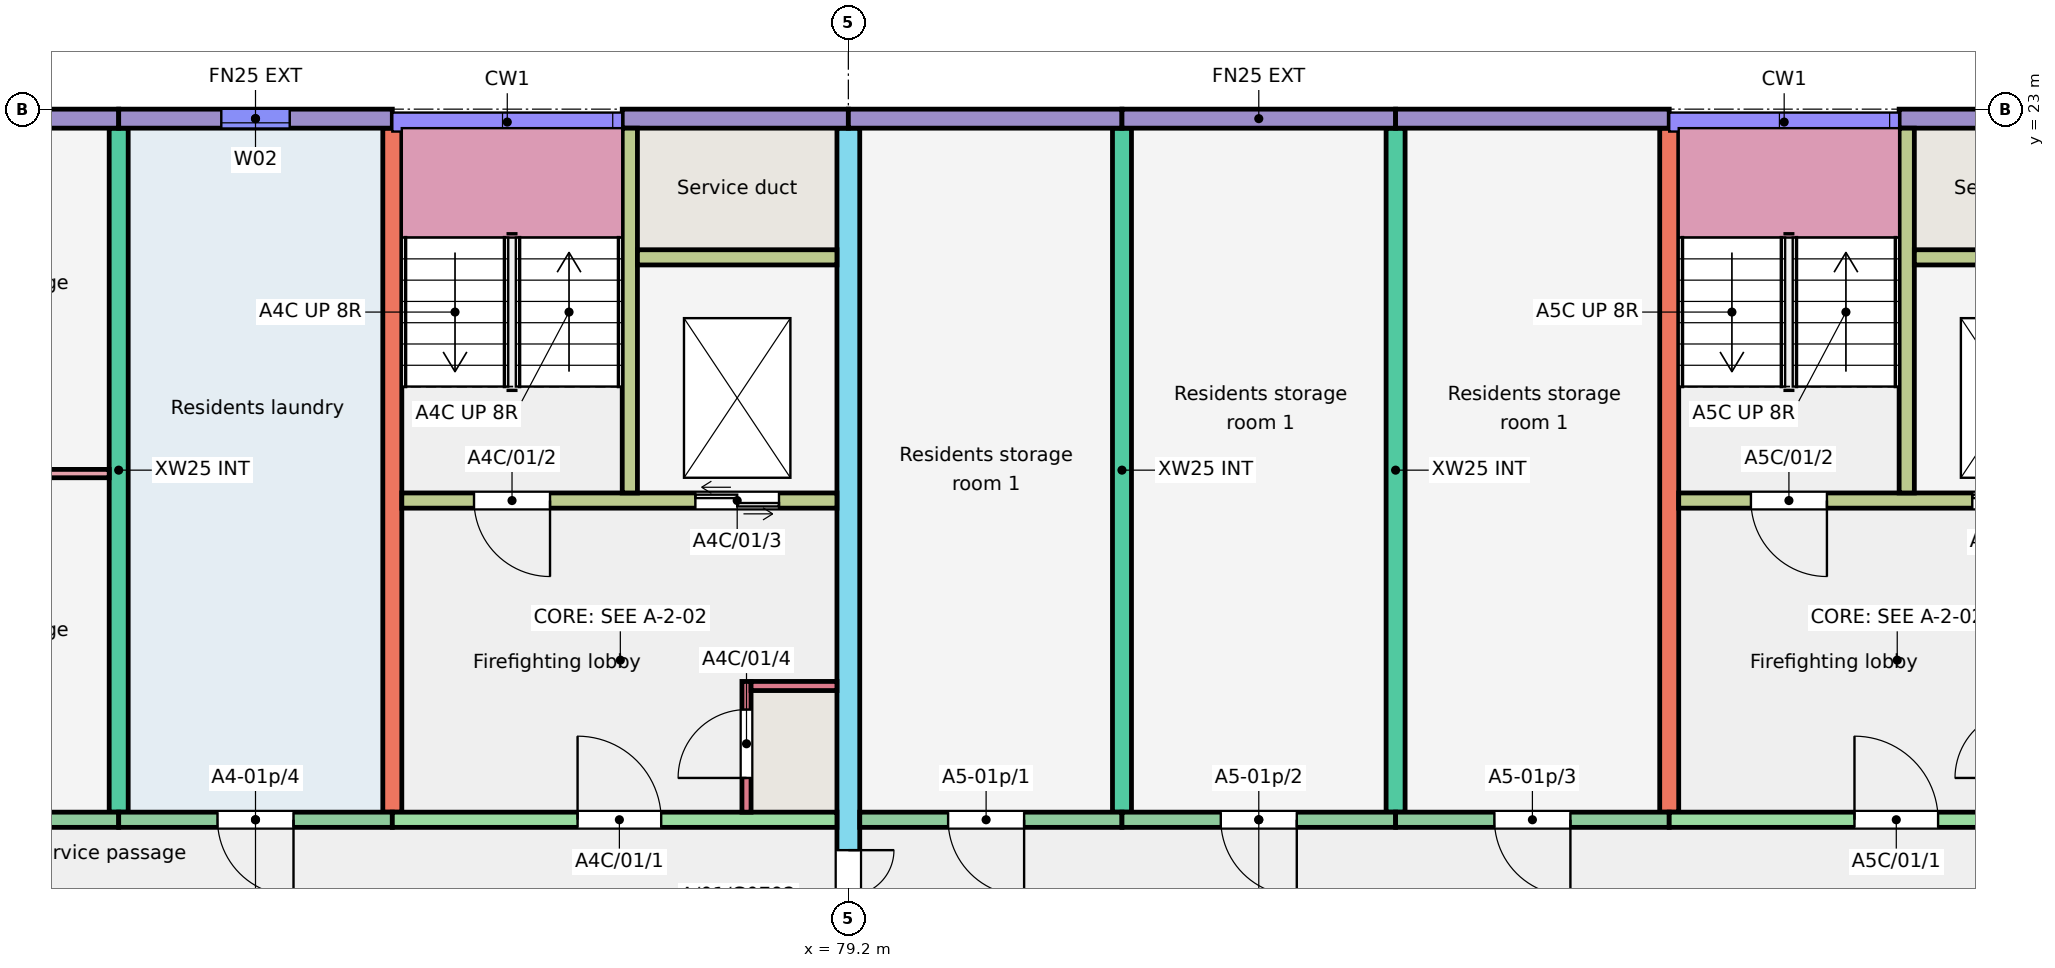
"""IFC4 building model, lengths in metres.
Left out: names, types, materials, properties, quantities, classifications, styles, units other than length and angle.
Written with IfcOpenShell. Run it as: python <this file> out.ifc"""

import sys

from ifc_helpers import new_model, si_unit, direction, frame, frame_2d, origin, place, context, subcontext, project, spatial, rectangle, extrude, element, fill, save


model = new_model("IFC4")
c1 = context("Model", 3, precision=1e-05, world=origin(), true_north=direction((0.0, 1.0)))
c2 = subcontext(c1, "Body", "Model", "MODEL_VIEW")
j1 = project(units=[si_unit("LENGTHUNIT", "METRE"), si_unit("PLANEANGLEUNIT", "RADIAN")], contexts=[c1])
p1 = place(None, origin())
s1 = spatial("IfcSite", under=j1, at=p1, CompositionType="ELEMENT")
p2 = place(p1, origin())
s2 = spatial("IfcBuilding", under=s1, at=p2, CompositionType="ELEMENT")
p3 = place(p2, frame((0.0, 0.0, 3.0)))
s3 = spatial("IfcBuildingStorey", under=s2, at=p3, CompositionType="ELEMENT", Elevation=3.0)
for number, where, z_axis, x_axis in (
    (1, (69.6, 13.75, 0.0), (0.0, 0.0, 1.0), (0.0, 1.0, 0.0)),
    (2, (73.2, 13.75, 0.0), (0.0, 0.0, 1.0), (0.0, 1.0, 0.0)),
):
    element("IfcWall", number, at=place(p3, frame(where, z_axis=z_axis, x_axis=x_axis)), inside=s3, PredefinedType="SHEAR", context=c2, shape_type="SweptSolid", body=[
        extrude(rectangle(XDim=9.0, YDim=0.25, at=frame_2d((4.5, 0.0))), origin(), (0.0, 0.0, 1.0), 3.0),
    ])
p4 = place(p3, frame((79.2, 11.75, 0.0), z_axis=(0.0, 0.0, 1.0), x_axis=(0.0, 1.0, 0.0)))
e3 = element("IfcWall", 3, at=p4, inside=s3, PredefinedType="SHEAR", context=c2, shape_type="SweptSolid", body=[
    extrude(rectangle(XDim=11.0, YDim=0.3, at=frame_2d((5.5, 0.0))), origin(), (0.0, 0.0, 1.0), 3.0),
])
p5 = place(p4, frame((0.3, 0.0, 0.0)))
e4 = element("IfcOpeningElement", 4, at=p5, cuts=e3, PredefinedType="OPENING", context=c2, shape_type="SweptSolid", body=[
    extrude(rectangle(XDim=1.2, YDim=2.1, at=frame_2d((0.6, 1.05))), frame((0.0, 0.16, 0.0), z_axis=(0.0, -1.0, 0.0), x_axis=(1.0, 0.0, 0.0)), (0.0, 0.0, 1.0), 0.32),
])
for number, where, z_axis, x_axis in (
    (5, (82.8, 13.75, 0.0), (0.0, 0.0, 1.0), (0.0, 1.0, 0.0)),
    (6, (86.4, 13.75, 0.0), (0.0, 0.0, 1.0), (0.0, 1.0, 0.0)),
    (7, (90.0, 13.75, 0.0), (0.0, 0.0, 1.0), (0.0, 1.0, 0.0)),
):
    element("IfcWall", number, at=place(p3, frame(where, z_axis=z_axis, x_axis=x_axis)), inside=s3, PredefinedType="SHEAR", context=c2, shape_type="SweptSolid", body=[
        extrude(rectangle(XDim=9.0, YDim=0.25, at=frame_2d((4.5, 0.0))), origin(), (0.0, 0.0, 1.0), 3.0),
    ])
p6 = place(p3, frame((66.0, 22.875, 0.0), z_axis=(0.0, 0.0, 1.0), x_axis=(1.0, 0.0, 0.0)))
e8 = element("IfcWall", 8, at=p6, inside=s3, PredefinedType="SOLIDWALL", context=c2, shape_type="SweptSolid", body=[
    extrude(rectangle(XDim=3.6, YDim=0.25, at=frame_2d((1.8, 0.0))), origin(), (0.0, 0.0, 1.0), 3.0),
])
p7 = place(p3, frame((66.0, 13.65, 0.0), z_axis=(0.0, 0.0, 1.0), x_axis=(1.0, 0.0, 0.0)))
e9 = element("IfcWall", 9, at=p7, inside=s3, PredefinedType="SOLIDWALL", context=c2, shape_type="SweptSolid", body=[
    extrude(rectangle(XDim=3.6, YDim=0.2, at=frame_2d((1.8, 0.0))), origin(), (0.0, 0.0, 1.0), 3.0),
])
p8 = place(p7, frame((1.3, 0.0, 0.0)))
e10 = element("IfcOpeningElement", 10, at=p8, cuts=e9, PredefinedType="OPENING", context=c2, shape_type="SweptSolid", body=[
    extrude(rectangle(XDim=1.0, YDim=2.1, at=frame_2d((0.5, 1.05))), frame((0.0, 0.11, 0.0), z_axis=(0.0, -1.0, 0.0), x_axis=(1.0, 0.0, 0.0)), (0.0, 0.0, 1.0), 0.22),
])
p9 = place(p3, frame((69.6, 22.875, 0.0), z_axis=(0.0, 0.0, 1.0), x_axis=(1.0, 0.0, 0.0)))
e11 = element("IfcWall", 11, at=p9, inside=s3, PredefinedType="SOLIDWALL", context=c2, shape_type="SweptSolid", body=[
    extrude(rectangle(XDim=3.6, YDim=0.25, at=frame_2d((1.8, 0.0))), origin(), (0.0, 0.0, 1.0), 3.0),
])
p10 = place(p9, frame((1.35, 0.0, 1.8)))
e12 = element("IfcOpeningElement", 12, at=p10, cuts=e11, PredefinedType="OPENING", context=c2, shape_type="SweptSolid", body=[
    extrude(rectangle(XDim=0.9, YDim=0.6, at=frame_2d((0.45, 0.3))), frame((0.0, 0.135, 0.0), z_axis=(0.0, -1.0, 0.0), x_axis=(1.0, 0.0, 0.0)), (0.0, 0.0, 1.0), 0.27),
])
p11 = place(p3, frame((69.6, 13.65, 0.0), z_axis=(0.0, 0.0, 1.0), x_axis=(1.0, 0.0, 0.0)))
e13 = element("IfcWall", 13, at=p11, inside=s3, PredefinedType="SOLIDWALL", context=c2, shape_type="SweptSolid", body=[
    extrude(rectangle(XDim=3.6, YDim=0.2, at=frame_2d((1.8, 0.0))), origin(), (0.0, 0.0, 1.0), 3.0),
])
p12 = place(p11, frame((1.3, 0.0, 0.0)))
e14 = element("IfcOpeningElement", 14, at=p12, cuts=e13, PredefinedType="OPENING", context=c2, shape_type="SweptSolid", body=[
    extrude(rectangle(XDim=1.0, YDim=2.1, at=frame_2d((0.5, 1.05))), frame((0.0, 0.11, 0.0), z_axis=(0.0, -1.0, 0.0), x_axis=(1.0, 0.0, 0.0)), (0.0, 0.0, 1.0), 0.22),
])
p13 = place(p3, frame((76.225, 22.875, 0.0), z_axis=(0.0, 0.0, 1.0), x_axis=(1.0, 0.0, 0.0)))
e15 = element("IfcWall", 15, at=p13, inside=s3, PredefinedType="SOLIDWALL", context=c2, shape_type="SweptSolid", body=[
    extrude(rectangle(XDim=2.975, YDim=0.25, at=frame_2d((1.487, 0.0))), origin(), (0.0, 0.0, 1.0), 3.0),
])
p14 = place(p3, frame((73.2, 13.65, 0.0), z_axis=(0.0, 0.0, 1.0), x_axis=(1.0, 0.0, 0.0)))
e16 = element("IfcWall", 16, at=p14, inside=s3, PredefinedType="SHEAR", context=c2, shape_type="SweptSolid", body=[
    extrude(rectangle(XDim=5.85, YDim=0.2, at=frame_2d((2.925, 0.0))), origin(), (0.0, 0.0, 1.0), 3.0),
])
p15 = place(p14, frame((2.438, 0.0, 0.0)))
e17 = element("IfcOpeningElement", 17, at=p15, cuts=e16, PredefinedType="OPENING", context=c2, shape_type="SweptSolid", body=[
    extrude(rectangle(XDim=1.1, YDim=2.1, at=frame_2d((0.55, 1.05))), frame((0.0, 0.11, 0.0), z_axis=(0.0, -1.0, 0.0), x_axis=(1.0, 0.0, 0.0)), (0.0, 0.0, 1.0), 0.22),
])
p16 = place(p3, frame((73.325, 17.85, 0.0), z_axis=(0.0, 0.0, 1.0), x_axis=(1.0, 0.0, 0.0)))
e18 = element("IfcWall", 18, at=p16, inside=s3, PredefinedType="SHEAR", context=c2, shape_type="SweptSolid", body=[
    extrude(rectangle(XDim=5.725, YDim=0.2, at=frame_2d((2.863, 0.0))), origin(), (0.0, 0.0, 1.0), 3.0),
])
p17 = place(p16, frame((0.95, 0.0, 0.0)))
e19 = element("IfcOpeningElement", 19, at=p17, cuts=e18, PredefinedType="OPENING", context=c2, shape_type="SweptSolid", body=[
    extrude(rectangle(XDim=1.0, YDim=2.1, at=frame_2d((0.5, 1.05))), frame((0.0, 0.11, 0.0), z_axis=(0.0, -1.0, 0.0), x_axis=(1.0, 0.0, 0.0)), (0.0, 0.0, 1.0), 0.22),
])
p18 = place(p16, frame((3.863, 0.0, 0.0)))
e20 = element("IfcOpeningElement", 20, at=p18, cuts=e18, PredefinedType="OPENING", context=c2, shape_type="SweptSolid", body=[
    extrude(rectangle(XDim=1.1, YDim=2.1, at=frame_2d((0.55, 1.05))), frame((0.0, 0.11, 0.0), z_axis=(0.0, -1.0, 0.0), x_axis=(1.0, 0.0, 0.0)), (0.0, 0.0, 1.0), 0.22),
])
p19 = place(p3, frame((76.325, 17.95, 0.0), z_axis=(0.0, 0.0, 1.0), x_axis=(0.0, 1.0, 0.0)))
e21 = element("IfcWall", 21, at=p19, inside=s3, PredefinedType="SHEAR", context=c2, shape_type="SweptSolid", body=[
    extrude(rectangle(XDim=4.8, YDim=0.2, at=frame_2d((2.4, 0.0))), origin(), (0.0, 0.0, 1.0), 3.0),
])
p20 = place(p3, frame((76.425, 21.05, 0.0), z_axis=(0.0, 0.0, 1.0), x_axis=(1.0, 0.0, 0.0)))
e22 = element("IfcWall", 22, at=p20, inside=s3, PredefinedType="SHEAR", context=c2, shape_type="SweptSolid", body=[
    extrude(rectangle(XDim=2.625, YDim=0.2, at=frame_2d((1.312, 0.0))), origin(), (0.0, 0.0, 1.0), 3.0),
])
p21 = place(p3, frame((77.86, 13.75, 0.0), z_axis=(0.0, 0.0, 1.0), x_axis=(0.0, 1.0, 0.0)))
e23 = element("IfcWall", 23, at=p21, inside=s3, PredefinedType="SHEAR", context=c2, shape_type="SweptSolid", body=[
    extrude(rectangle(XDim=1.72, YDim=0.12, at=frame_2d((0.86, 0.0))), origin(), (0.0, 0.0, 1.0), 3.0),
])
p22 = place(p21, frame((0.45, 0.0, 0.0)))
e24 = element("IfcOpeningElement", 24, at=p22, cuts=e23, PredefinedType="OPENING", context=c2, shape_type="SweptSolid", body=[
    extrude(rectangle(XDim=0.9, YDim=2.1, at=frame_2d((0.45, 1.05))), frame((0.0, 0.07, 0.0), z_axis=(0.0, -1.0, 0.0), x_axis=(1.0, 0.0, 0.0)), (0.0, 0.0, 1.0), 0.14),
])
p23 = place(p3, frame((77.92, 15.41, 0.0), z_axis=(0.0, 0.0, 1.0), x_axis=(1.0, 0.0, 0.0)))
e25 = element("IfcWall", 25, at=p23, inside=s3, PredefinedType="SHEAR", context=c2, shape_type="SweptSolid", body=[
    extrude(rectangle(XDim=1.13, YDim=0.12, at=frame_2d((0.565, 0.0))), origin(), (0.0, 0.0, 1.0), 3.0),
])
p24 = place(p3, frame((79.2, 22.875, 0.0), z_axis=(0.0, 0.0, 1.0), x_axis=(1.0, 0.0, 0.0)))
e26 = element("IfcWall", 26, at=p24, inside=s3, PredefinedType="SOLIDWALL", context=c2, shape_type="SweptSolid", body=[
    extrude(rectangle(XDim=3.6, YDim=0.25, at=frame_2d((1.8, 0.0))), origin(), (0.0, 0.0, 1.0), 3.0),
])
p25 = place(p3, frame((79.35, 13.65, 0.0), z_axis=(0.0, 0.0, 1.0), x_axis=(1.0, 0.0, 0.0)))
e27 = element("IfcWall", 27, at=p25, inside=s3, PredefinedType="SOLIDWALL", context=c2, shape_type="SweptSolid", body=[
    extrude(rectangle(XDim=3.45, YDim=0.2, at=frame_2d((1.725, 0.0))), origin(), (0.0, 0.0, 1.0), 3.0),
])
p26 = place(p25, frame((1.163, 0.0, 0.0)))
e28 = element("IfcOpeningElement", 28, at=p26, cuts=e27, PredefinedType="OPENING", context=c2, shape_type="SweptSolid", body=[
    extrude(rectangle(XDim=1.0, YDim=2.1, at=frame_2d((0.5, 1.05))), frame((0.0, 0.11, 0.0), z_axis=(0.0, -1.0, 0.0), x_axis=(1.0, 0.0, 0.0)), (0.0, 0.0, 1.0), 0.22),
])
p27 = place(p3, frame((82.8, 22.875, 0.0), z_axis=(0.0, 0.0, 1.0), x_axis=(1.0, 0.0, 0.0)))
e29 = element("IfcWall", 29, at=p27, inside=s3, PredefinedType="SOLIDWALL", context=c2, shape_type="SweptSolid", body=[
    extrude(rectangle(XDim=3.6, YDim=0.25, at=frame_2d((1.8, 0.0))), origin(), (0.0, 0.0, 1.0), 3.0),
])
p28 = place(p3, frame((82.8, 13.65, 0.0), z_axis=(0.0, 0.0, 1.0), x_axis=(1.0, 0.0, 0.0)))
e30 = element("IfcWall", 30, at=p28, inside=s3, PredefinedType="SOLIDWALL", context=c2, shape_type="SweptSolid", body=[
    extrude(rectangle(XDim=3.6, YDim=0.2, at=frame_2d((1.8, 0.0))), origin(), (0.0, 0.0, 1.0), 3.0),
])
p29 = place(p28, frame((1.3, 0.0, 0.0)))
e31 = element("IfcOpeningElement", 31, at=p29, cuts=e30, PredefinedType="OPENING", context=c2, shape_type="SweptSolid", body=[
    extrude(rectangle(XDim=1.0, YDim=2.1, at=frame_2d((0.5, 1.05))), frame((0.0, 0.11, 0.0), z_axis=(0.0, -1.0, 0.0), x_axis=(1.0, 0.0, 0.0)), (0.0, 0.0, 1.0), 0.22),
])
p30 = place(p3, frame((86.4, 22.875, 0.0), z_axis=(0.0, 0.0, 1.0), x_axis=(1.0, 0.0, 0.0)))
e32 = element("IfcWall", 32, at=p30, inside=s3, PredefinedType="SOLIDWALL", context=c2, shape_type="SweptSolid", body=[
    extrude(rectangle(XDim=3.6, YDim=0.25, at=frame_2d((1.8, 0.0))), origin(), (0.0, 0.0, 1.0), 3.0),
])
p31 = place(p3, frame((86.4, 13.65, 0.0), z_axis=(0.0, 0.0, 1.0), x_axis=(1.0, 0.0, 0.0)))
e33 = element("IfcWall", 33, at=p31, inside=s3, PredefinedType="SOLIDWALL", context=c2, shape_type="SweptSolid", body=[
    extrude(rectangle(XDim=3.6, YDim=0.2, at=frame_2d((1.8, 0.0))), origin(), (0.0, 0.0, 1.0), 3.0),
])
p32 = place(p31, frame((1.3, 0.0, 0.0)))
e34 = element("IfcOpeningElement", 34, at=p32, cuts=e33, PredefinedType="OPENING", context=c2, shape_type="SweptSolid", body=[
    extrude(rectangle(XDim=1.0, YDim=2.1, at=frame_2d((0.5, 1.05))), frame((0.0, 0.11, 0.0), z_axis=(0.0, -1.0, 0.0), x_axis=(1.0, 0.0, 0.0)), (0.0, 0.0, 1.0), 0.22),
])
p33 = place(p3, frame((93.025, 22.875, 0.0), z_axis=(0.0, 0.0, 1.0), x_axis=(1.0, 0.0, 0.0)))
e35 = element("IfcWall", 35, at=p33, inside=s3, PredefinedType="SOLIDWALL", context=c2, shape_type="SweptSolid", body=[
    extrude(rectangle(XDim=2.975, YDim=0.25, at=frame_2d((1.488, 0.0))), origin(), (0.0, 0.0, 1.0), 3.0),
])
p34 = place(p3, frame((90.0, 13.65, 0.0), z_axis=(0.0, 0.0, 1.0), x_axis=(1.0, 0.0, 0.0)))
e36 = element("IfcWall", 36, at=p34, inside=s3, PredefinedType="SHEAR", context=c2, shape_type="SweptSolid", body=[
    extrude(rectangle(XDim=5.85, YDim=0.2, at=frame_2d((2.925, 0.0))), origin(), (0.0, 0.0, 1.0), 3.0),
])
p35 = place(p34, frame((2.438, 0.0, 0.0)))
e37 = element("IfcOpeningElement", 37, at=p35, cuts=e36, PredefinedType="OPENING", context=c2, shape_type="SweptSolid", body=[
    extrude(rectangle(XDim=1.1, YDim=2.1, at=frame_2d((0.55, 1.05))), frame((0.0, 0.11, 0.0), z_axis=(0.0, -1.0, 0.0), x_axis=(1.0, 0.0, 0.0)), (0.0, 0.0, 1.0), 0.22),
])
p36 = place(p3, frame((90.125, 17.85, 0.0), z_axis=(0.0, 0.0, 1.0), x_axis=(1.0, 0.0, 0.0)))
e38 = element("IfcWall", 38, at=p36, inside=s3, PredefinedType="SHEAR", context=c2, shape_type="SweptSolid", body=[
    extrude(rectangle(XDim=5.725, YDim=0.2, at=frame_2d((2.863, 0.0))), origin(), (0.0, 0.0, 1.0), 3.0),
])
p37 = place(p36, frame((0.95, 0.0, 0.0)))
e39 = element("IfcOpeningElement", 39, at=p37, cuts=e38, PredefinedType="OPENING", context=c2, shape_type="SweptSolid", body=[
    extrude(rectangle(XDim=1.0, YDim=2.1, at=frame_2d((0.5, 1.05))), frame((0.0, 0.11, 0.0), z_axis=(0.0, -1.0, 0.0), x_axis=(1.0, 0.0, 0.0)), (0.0, 0.0, 1.0), 0.22),
])
p38 = place(p36, frame((3.863, 0.0, 0.0)))
e40 = element("IfcOpeningElement", 40, at=p38, cuts=e38, PredefinedType="OPENING", context=c2, shape_type="SweptSolid", body=[
    extrude(rectangle(XDim=1.1, YDim=2.1, at=frame_2d((0.55, 1.05))), frame((0.0, 0.11, 0.0), z_axis=(0.0, -1.0, 0.0), x_axis=(1.0, 0.0, 0.0)), (0.0, 0.0, 1.0), 0.22),
])
p39 = place(p3, frame((93.125, 17.95, 0.0), z_axis=(0.0, 0.0, 1.0), x_axis=(0.0, 1.0, 0.0)))
e41 = element("IfcWall", 41, at=p39, inside=s3, PredefinedType="SHEAR", context=c2, shape_type="SweptSolid", body=[
    extrude(rectangle(XDim=4.8, YDim=0.2, at=frame_2d((2.4, 0.0))), origin(), (0.0, 0.0, 1.0), 3.0),
])
p40 = place(p3, frame((93.225, 21.05, 0.0), z_axis=(0.0, 0.0, 1.0), x_axis=(1.0, 0.0, 0.0)))
e42 = element("IfcWall", 42, at=p40, inside=s3, PredefinedType="SHEAR", context=c2, shape_type="SweptSolid", body=[
    extrude(rectangle(XDim=2.625, YDim=0.2, at=frame_2d((1.312, 0.0))), origin(), (0.0, 0.0, 1.0), 3.0),
])
p41 = place(p3, frame((66.125, 18.205, 0.0), z_axis=(0.0, 0.0, 1.0), x_axis=(1.0, 0.0, 0.0)))
e43 = element("IfcWall", 43, at=p41, inside=s3, PredefinedType="PARTITIONING", context=c2, shape_type="SweptSolid", body=[
    extrude(rectangle(XDim=3.35, YDim=0.11, at=frame_2d((1.675, 0.0))), origin(), (0.0, 0.0, 1.0), 2.8),
])
p42 = place(p41, frame((1.225, 0.0, 0.0)))
e44 = element("IfcOpeningElement", 44, at=p42, cuts=e43, PredefinedType="OPENING", context=c2, shape_type="SweptSolid", body=[
    extrude(rectangle(XDim=0.9, YDim=2.1, at=frame_2d((0.45, 1.05))), frame((0.0, 0.065, 0.0), z_axis=(0.0, -1.0, 0.0), x_axis=(1.0, 0.0, 0.0)), (0.0, 0.0, 1.0), 0.13),
])
p43 = place(p10, origin())
e45 = element("IfcWindow", 45, at=p43, inside=s3, PartitioningType="SINGLE_PANEL", PredefinedType="WINDOW", context=c2, shape_type="SweptSolid", body=[
    extrude(rectangle(XDim=0.9, YDim=0.6, at=frame_2d((0.45, 0.3))), frame((0.0, -0.025, 0.0), z_axis=(0.0, -1.0, 0.0), x_axis=(1.0, 0.0, 0.0)), (0.0, 0.0, 1.0), 0.06),
])
fill(e12, e45)
p44 = place(p12, origin())
e46 = element("IfcDoor", 46, at=p44, inside=s3, OperationType="SINGLE_SWING_RIGHT", PredefinedType="DOOR", context=c2, shape_type="SweptSolid", body=[
    extrude(rectangle(XDim=1.0, YDim=2.1, at=frame_2d((0.5, 1.05))), frame((0.0, 0.025, 0.0), z_axis=(0.0, -1.0, 0.0), x_axis=(1.0, 0.0, 0.0)), (0.0, 0.0, 1.0), 0.05),
])
fill(e14, e46)
p45 = place(p26, origin())
e47 = element("IfcDoor", 47, at=p45, inside=s3, OperationType="SINGLE_SWING_RIGHT", PredefinedType="DOOR", context=c2, shape_type="SweptSolid", body=[
    extrude(rectangle(XDim=1.0, YDim=2.1, at=frame_2d((0.5, 1.05))), frame((0.0, 0.025, 0.0), z_axis=(0.0, -1.0, 0.0), x_axis=(1.0, 0.0, 0.0)), (0.0, 0.0, 1.0), 0.05),
])
fill(e28, e47)
p46 = place(p29, origin())
e48 = element("IfcDoor", 48, at=p46, inside=s3, OperationType="SINGLE_SWING_RIGHT", PredefinedType="DOOR", context=c2, shape_type="SweptSolid", body=[
    extrude(rectangle(XDim=1.0, YDim=2.1, at=frame_2d((0.5, 1.05))), frame((0.0, 0.025, 0.0), z_axis=(0.0, -1.0, 0.0), x_axis=(1.0, 0.0, 0.0)), (0.0, 0.0, 1.0), 0.05),
])
fill(e31, e48)
p47 = place(p32, origin())
e49 = element("IfcDoor", 49, at=p47, inside=s3, OperationType="SINGLE_SWING_RIGHT", PredefinedType="DOOR", context=c2, shape_type="SweptSolid", body=[
    extrude(rectangle(XDim=1.0, YDim=2.1, at=frame_2d((0.5, 1.05))), frame((0.0, 0.025, 0.0), z_axis=(0.0, -1.0, 0.0), x_axis=(1.0, 0.0, 0.0)), (0.0, 0.0, 1.0), 0.05),
])
fill(e34, e49)
p48 = place(p15, origin())
e50 = element("IfcDoor", 50, at=p48, inside=s3, OperationType="SINGLE_SWING_LEFT", PredefinedType="DOOR", context=c2, shape_type="SweptSolid", body=[
    extrude(rectangle(XDim=1.1, YDim=2.1, at=frame_2d((0.55, 1.05))), frame((0.0, 0.025, 0.0), z_axis=(0.0, -1.0, 0.0), x_axis=(1.0, 0.0, 0.0)), (0.0, 0.0, 1.0), 0.05),
])
fill(e17, e50)
p49 = place(p17, origin())
e51 = element("IfcDoor", 51, at=p49, inside=s3, OperationType="SINGLE_SWING_RIGHT", PredefinedType="DOOR", context=c2, shape_type="SweptSolid", body=[
    extrude(rectangle(XDim=1.0, YDim=2.1, at=frame_2d((0.5, 1.05))), frame((0.0, 0.025, 0.0), z_axis=(0.0, -1.0, 0.0), x_axis=(1.0, 0.0, 0.0)), (0.0, 0.0, 1.0), 0.05),
])
fill(e19, e51)
p50 = place(p18, origin())
e52 = element("IfcDoor", 52, at=p50, inside=s3, OperationType="DOUBLE_DOOR_SLIDING", PredefinedType="DOOR", context=c2, shape_type="SweptSolid", body=[
    extrude(rectangle(XDim=1.1, YDim=2.1, at=frame_2d((0.55, 1.05))), frame((0.0, 0.025, 0.0), z_axis=(0.0, -1.0, 0.0), x_axis=(1.0, 0.0, 0.0)), (0.0, 0.0, 1.0), 0.05),
])
fill(e20, e52)
p51 = place(p22, origin())
e53 = element("IfcDoor", 53, at=p51, inside=s3, OperationType="SINGLE_SWING_LEFT", PredefinedType="DOOR", context=c2, shape_type="SweptSolid", body=[
    extrude(rectangle(XDim=0.9, YDim=2.1, at=frame_2d((0.45, 1.05))), frame((0.0, 0.025, 0.0), z_axis=(0.0, -1.0, 0.0), x_axis=(1.0, 0.0, 0.0)), (0.0, 0.0, 1.0), 0.05),
])
fill(e24, e53)
p52 = place(p35, origin())
e54 = element("IfcDoor", 54, at=p52, inside=s3, OperationType="SINGLE_SWING_LEFT", PredefinedType="DOOR", context=c2, shape_type="SweptSolid", body=[
    extrude(rectangle(XDim=1.1, YDim=2.1, at=frame_2d((0.55, 1.05))), frame((0.0, 0.025, 0.0), z_axis=(0.0, -1.0, 0.0), x_axis=(1.0, 0.0, 0.0)), (0.0, 0.0, 1.0), 0.05),
])
fill(e37, e54)
p53 = place(p37, origin())
e55 = element("IfcDoor", 55, at=p53, inside=s3, OperationType="SINGLE_SWING_RIGHT", PredefinedType="DOOR", context=c2, shape_type="SweptSolid", body=[
    extrude(rectangle(XDim=1.0, YDim=2.1, at=frame_2d((0.5, 1.05))), frame((0.0, 0.025, 0.0), z_axis=(0.0, -1.0, 0.0), x_axis=(1.0, 0.0, 0.0)), (0.0, 0.0, 1.0), 0.05),
])
fill(e39, e55)
p54 = place(p38, origin())
e56 = element("IfcDoor", 56, at=p54, inside=s3, OperationType="DOUBLE_DOOR_SLIDING", PredefinedType="DOOR", context=c2, shape_type="SweptSolid", body=[
    extrude(rectangle(XDim=1.1, YDim=2.1, at=frame_2d((0.55, 1.05))), frame((0.0, 0.025, 0.0), z_axis=(0.0, -1.0, 0.0), x_axis=(1.0, 0.0, 0.0)), (0.0, 0.0, 1.0), 0.05),
])
fill(e40, e56)
p55 = place(p5, origin())
e57 = element("IfcDoor", 57, at=p55, inside=s3, OperationType="DOUBLE_DOOR_SINGLE_SWING", PredefinedType="DOOR", context=c2, shape_type="SweptSolid", body=[
    extrude(rectangle(XDim=1.2, YDim=2.1, at=frame_2d((0.6, 1.05))), frame((0.0, 0.025, 0.0), z_axis=(0.0, -1.0, 0.0), x_axis=(1.0, 0.0, 0.0)), (0.0, 0.0, 1.0), 0.05),
])
fill(e4, e57)
save(model, sys.argv[1])
